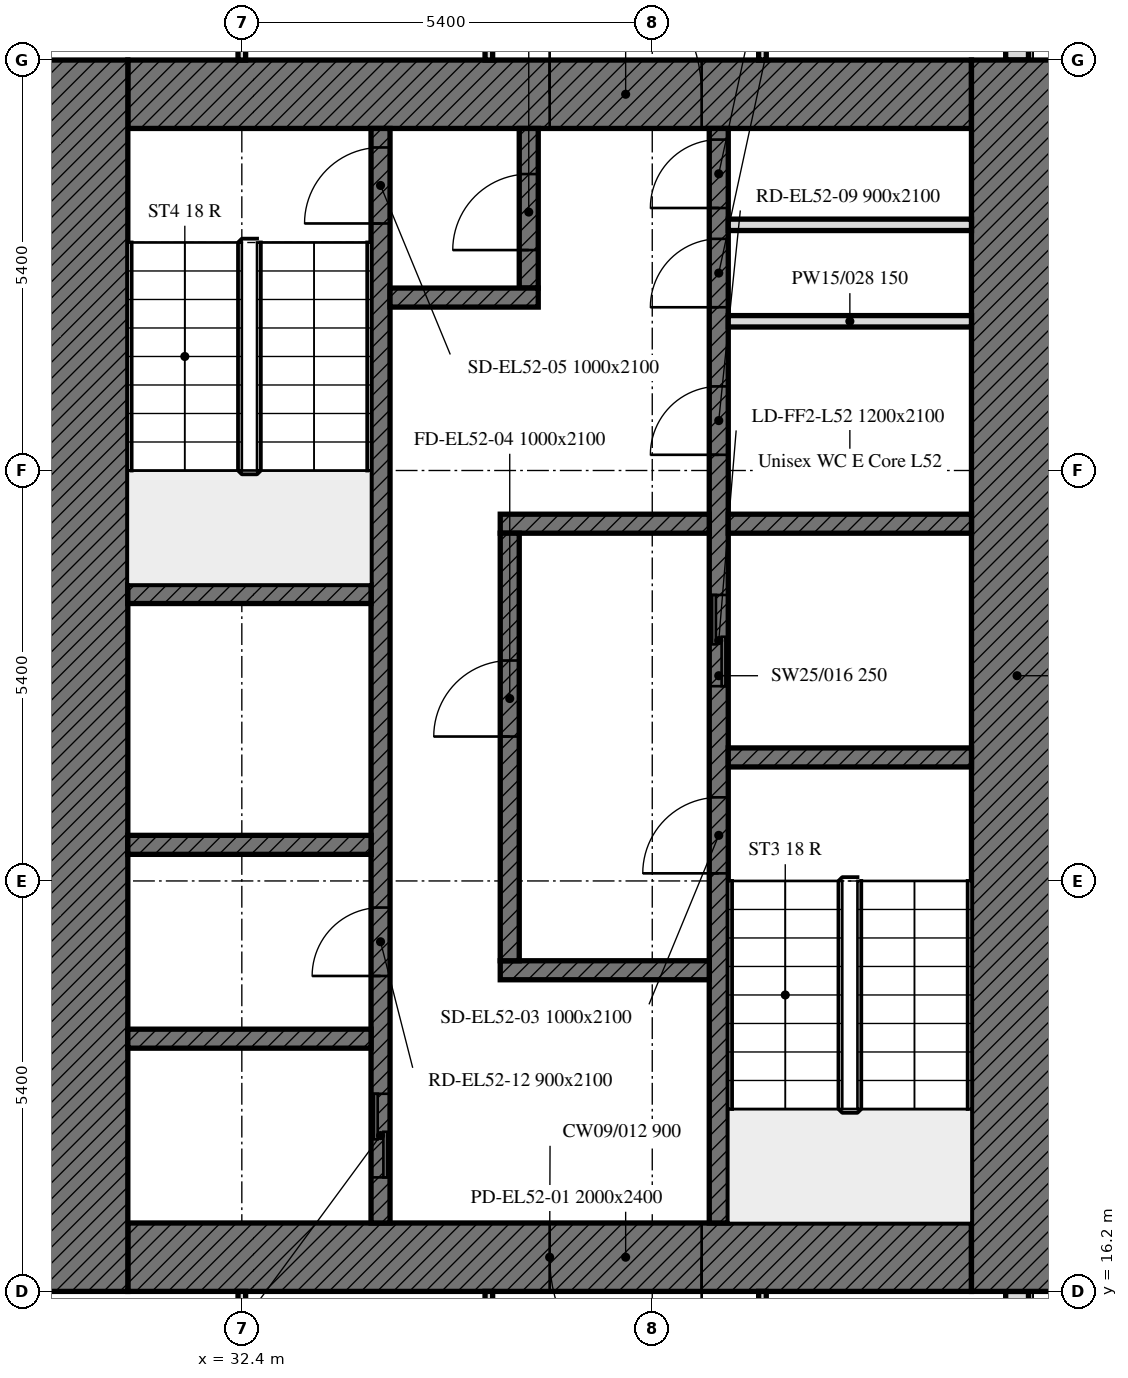
"""IFC4 building model, lengths in metres.
Left out: names, types, materials, properties, quantities, classifications, styles, units other than length and angle.
Written with IfcOpenShell. Run it as: python <this file> out.ifc"""

import sys

from ifc_helpers import new_model, si_unit, direction, frame, frame_2d, origin, place, context, subcontext, project, spatial, rectangle, extrude, element, fill, save


model = new_model("IFC4")
c1 = context("Model", 3, precision=1e-05, world=origin(), true_north=direction((0.0, 1.0)))
c2 = subcontext(c1, "Body", "Model", "MODEL_VIEW")
j1 = project(units=[si_unit("LENGTHUNIT", "METRE"), si_unit("PLANEANGLEUNIT", "RADIAN")], contexts=[c1])
p1 = place(None, origin())
s1 = spatial("IfcSite", under=j1, at=p1, CompositionType="ELEMENT")
p2 = place(p1, origin())
s2 = spatial("IfcBuilding", under=s1, at=p2, CompositionType="ELEMENT")
p3 = place(p2, frame((0.0, 0.0, 210.4)))
s3 = spatial("IfcBuildingStorey", under=s2, at=p3, CompositionType="ELEMENT", Elevation=210.4)
p4 = place(p3, frame((42.6, 10.986, 0.0), z_axis=(0.0, 0.0, 1.0), x_axis=(0.0, 1.0, 0.0)))
e1 = element("IfcWall", 1, at=p4, inside=s3, PredefinedType="SOLIDWALL", context=c2, shape_type="SweptSolid", body=[
    extrude(rectangle(XDim=5.214, YDim=0.3, at=frame_2d((2.607, 0.0))), origin(), (0.0, 0.0, 1.0), 3.0),
])
p5 = place(p4, frame((1.164, 0.0, 0.9)))
e2 = element("IfcOpeningElement", 2, at=p5, cuts=e1, PredefinedType="OPENING", context=c2, shape_type="SweptSolid", body=[
    extrude(rectangle(XDim=1.1, YDim=1.7, at=frame_2d((0.55, 0.85))), frame((0.0, 0.16, 0.0), z_axis=(0.0, -1.0, 0.0), x_axis=(1.0, 0.0, 0.0)), (0.0, 0.0, 1.0), 0.32),
])
p6 = place(p4, frame((2.764, 0.0, 0.9)))
e3 = element("IfcOpeningElement", 3, at=p6, cuts=e1, PredefinedType="OPENING", context=c2, shape_type="SweptSolid", body=[
    extrude(rectangle(XDim=1.1, YDim=1.7, at=frame_2d((0.55, 0.85))), frame((0.0, 0.16, 0.0), z_axis=(0.0, -1.0, 0.0), x_axis=(1.0, 0.0, 0.0)), (0.0, 0.0, 1.0), 0.32),
])
p7 = place(p3, frame((42.6, 32.4, 0.0), z_axis=(0.0, 0.0, 1.0), x_axis=(0.0, 1.0, 0.0)))
e4 = element("IfcWall", 4, at=p7, inside=s3, PredefinedType="SOLIDWALL", context=c2, shape_type="SweptSolid", body=[
    extrude(rectangle(XDim=10.614, YDim=0.3, at=frame_2d((5.307, 0.0))), origin(), (0.0, 0.0, 1.0), 3.0),
])
p8 = place(p7, frame((1.35, 0.0, 0.9)))
e5 = element("IfcOpeningElement", 5, at=p8, cuts=e4, PredefinedType="OPENING", context=c2, shape_type="SweptSolid", body=[
    extrude(rectangle(XDim=1.1, YDim=1.7, at=frame_2d((0.55, 0.85))), frame((0.0, 0.16, 0.0), z_axis=(0.0, -1.0, 0.0), x_axis=(1.0, 0.0, 0.0)), (0.0, 0.0, 1.0), 0.32),
])
p9 = place(p7, frame((2.95, 0.0, 0.9)))
e6 = element("IfcOpeningElement", 6, at=p9, cuts=e4, PredefinedType="OPENING", context=c2, shape_type="SweptSolid", body=[
    extrude(rectangle(XDim=1.1, YDim=1.7, at=frame_2d((0.55, 0.85))), frame((0.0, 0.16, 0.0), z_axis=(0.0, -1.0, 0.0), x_axis=(1.0, 0.0, 0.0)), (0.0, 0.0, 1.0), 0.32),
])
p10 = place(p7, frame((6.825, 0.0, 0.9)))
e7 = element("IfcOpeningElement", 7, at=p10, cuts=e4, PredefinedType="OPENING", context=c2, shape_type="SweptSolid", body=[
    extrude(rectangle(XDim=0.65, YDim=1.7, at=frame_2d((0.325, 0.85))), frame((0.0, 0.16, 0.0), z_axis=(0.0, -1.0, 0.0), x_axis=(1.0, 0.0, 0.0)), (0.0, 0.0, 1.0), 0.32),
])
p11 = place(p7, frame((8.35, 0.0, 0.9)))
e8 = element("IfcOpeningElement", 8, at=p11, cuts=e4, PredefinedType="OPENING", context=c2, shape_type="SweptSolid", body=[
    extrude(rectangle(XDim=1.1, YDim=1.7, at=frame_2d((0.55, 0.85))), frame((0.0, 0.16, 0.0), z_axis=(0.0, -1.0, 0.0), x_axis=(1.0, 0.0, 0.0)), (0.0, 0.0, 1.0), 0.32),
])
p12 = place(p3, frame((42.0, 16.65, 0.0), z_axis=(0.0, 0.0, 1.0), x_axis=(-1.0, 0.0, 0.0)))
e9 = element("IfcWall", 9, at=p12, inside=s3, PredefinedType="SOLIDWALL", context=c2, shape_type="SweptSolid", body=[
    extrude(rectangle(XDim=11.1, YDim=0.9, at=frame_2d((5.55, 0.0))), origin(), (0.0, 0.0, 1.0), 3.0),
])
p13 = place(p12, frame((3.55, 0.0, 0.0)))
e10 = element("IfcOpeningElement", 10, at=p13, cuts=e9, PredefinedType="OPENING", context=c2, shape_type="SweptSolid", body=[
    extrude(rectangle(XDim=2.0, YDim=2.4, at=frame_2d((1.0, 1.2))), frame((0.0, 0.45, 0.0), z_axis=(0.0, -1.0, 0.0), x_axis=(1.0, 0.0, 0.0)), (0.0, 0.0, 1.0), 0.9),
])
p14 = place(p3, frame((30.9, 31.95, 0.0), z_axis=(0.0, 0.0, 1.0), x_axis=(1.0, 0.0, 0.0)))
e11 = element("IfcWall", 11, at=p14, inside=s3, PredefinedType="SOLIDWALL", context=c2, shape_type="SweptSolid", body=[
    extrude(rectangle(XDim=11.1, YDim=0.9, at=frame_2d((5.55, 0.0))), origin(), (0.0, 0.0, 1.0), 3.0),
])
p15 = place(p14, frame((5.55, 0.0, 0.0)))
e12 = element("IfcOpeningElement", 12, at=p15, cuts=e11, PredefinedType="OPENING", context=c2, shape_type="SweptSolid", body=[
    extrude(rectangle(XDim=2.0, YDim=2.4, at=frame_2d((1.0, 1.2))), frame((0.0, 0.45, 0.0), z_axis=(0.0, -1.0, 0.0), x_axis=(1.0, 0.0, 0.0)), (0.0, 0.0, 1.0), 0.9),
])
for number, where, z_axis, x_axis in (
    (13, (42.6, 32.4, 0.0), (0.0, 0.0, 1.0), (0.0, -1.0, 0.0)),
    (14, (30.3, 16.2, 0.0), (0.0, 0.0, 1.0), (0.0, 1.0, 0.0)),
):
    element("IfcWall", number, at=place(p3, frame(where, z_axis=z_axis, x_axis=x_axis)), inside=s3, PredefinedType="SOLIDWALL", context=c2, shape_type="SweptSolid", body=[
        extrude(rectangle(XDim=16.2, YDim=1.2, at=frame_2d((8.1, 0.0))), origin(), (0.0, 0.0, 1.0), 3.0),
    ])
p16 = place(p3, frame((38.675, 17.1, 0.0), z_axis=(0.0, 0.0, 1.0), x_axis=(0.0, 1.0, 0.0)))
e15 = element("IfcWall", 15, at=p16, inside=s3, PredefinedType="SOLIDWALL", context=c2, shape_type="SweptSolid", body=[
    extrude(rectangle(XDim=14.4, YDim=0.25, at=frame_2d((7.2, 0.0))), origin(), (0.0, 0.0, 1.0), 3.0),
])
p17 = place(p16, frame((4.6, 0.0, 0.0)))
e16 = element("IfcOpeningElement", 16, at=p17, cuts=e15, PredefinedType="OPENING", context=c2, shape_type="SweptSolid", body=[
    extrude(rectangle(XDim=1.0, YDim=2.1, at=frame_2d((0.5, 1.05))), frame((0.0, 0.125, 0.0), z_axis=(0.0, -1.0, 0.0), x_axis=(1.0, 0.0, 0.0)), (0.0, 0.0, 1.0), 0.25),
])
p18 = place(p16, frame((7.062, 0.0, 0.0)))
e17 = element("IfcOpeningElement", 17, at=p18, cuts=e15, PredefinedType="OPENING", context=c2, shape_type="SweptSolid", body=[
    extrude(rectangle(XDim=1.2, YDim=2.1, at=frame_2d((0.6, 1.05))), frame((0.0, 0.125, 0.0), z_axis=(0.0, -1.0, 0.0), x_axis=(1.0, 0.0, 0.0)), (0.0, 0.0, 1.0), 0.25),
])
p19 = place(p16, frame((10.106, 0.0, 0.0)))
e18 = element("IfcOpeningElement", 18, at=p19, cuts=e15, PredefinedType="OPENING", context=c2, shape_type="SweptSolid", body=[
    extrude(rectangle(XDim=0.9, YDim=2.1, at=frame_2d((0.45, 1.05))), frame((0.0, 0.125, 0.0), z_axis=(0.0, -1.0, 0.0), x_axis=(1.0, 0.0, 0.0)), (0.0, 0.0, 1.0), 0.25),
])
p20 = place(p16, frame((12.048, 0.0, 0.0)))
e19 = element("IfcOpeningElement", 19, at=p20, cuts=e15, PredefinedType="OPENING", context=c2, shape_type="SweptSolid", body=[
    extrude(rectangle(XDim=0.9, YDim=2.1, at=frame_2d((0.45, 1.05))), frame((0.0, 0.125, 0.0), z_axis=(0.0, -1.0, 0.0), x_axis=(1.0, 0.0, 0.0)), (0.0, 0.0, 1.0), 0.25),
])
p21 = place(p16, frame((13.354, 0.0, 0.0)))
e20 = element("IfcOpeningElement", 20, at=p21, cuts=e15, PredefinedType="OPENING", context=c2, shape_type="SweptSolid", body=[
    extrude(rectangle(XDim=0.9, YDim=2.1, at=frame_2d((0.45, 1.05))), frame((0.0, 0.125, 0.0), z_axis=(0.0, -1.0, 0.0), x_axis=(1.0, 0.0, 0.0)), (0.0, 0.0, 1.0), 0.25),
])
p22 = place(p3, frame((34.225, 17.1, 0.0), z_axis=(0.0, 0.0, 1.0), x_axis=(0.0, 1.0, 0.0)))
e21 = element("IfcWall", 21, at=p22, inside=s3, PredefinedType="SOLIDWALL", context=c2, shape_type="SweptSolid", body=[
    extrude(rectangle(XDim=14.4, YDim=0.25, at=frame_2d((7.2, 0.0))), origin(), (0.0, 0.0, 1.0), 3.0),
])
p23 = place(p22, frame((13.15, 0.0, 0.0)))
e22 = element("IfcOpeningElement", 22, at=p23, cuts=e21, PredefinedType="OPENING", context=c2, shape_type="SweptSolid", body=[
    extrude(rectangle(XDim=1.0, YDim=2.1, at=frame_2d((0.5, 1.05))), frame((0.0, 0.125, 0.0), z_axis=(0.0, -1.0, 0.0), x_axis=(1.0, 0.0, 0.0)), (0.0, 0.0, 1.0), 0.25),
])
p24 = place(p22, frame((0.6, 0.0, 0.0)))
e23 = element("IfcOpeningElement", 23, at=p24, cuts=e21, PredefinedType="OPENING", context=c2, shape_type="SweptSolid", body=[
    extrude(rectangle(XDim=1.1, YDim=2.1, at=frame_2d((0.55, 1.05))), frame((0.0, 0.125, 0.0), z_axis=(0.0, -1.0, 0.0), x_axis=(1.0, 0.0, 0.0)), (0.0, 0.0, 1.0), 0.25),
])
p25 = place(p22, frame((3.25, 0.0, 0.0)))
e24 = element("IfcOpeningElement", 24, at=p25, cuts=e21, PredefinedType="OPENING", context=c2, shape_type="SweptSolid", body=[
    extrude(rectangle(XDim=0.9, YDim=2.1, at=frame_2d((0.45, 1.05))), frame((0.0, 0.125, 0.0), z_axis=(0.0, -1.0, 0.0), x_axis=(1.0, 0.0, 0.0)), (0.0, 0.0, 1.0), 0.25),
])
p26 = place(p3, frame((38.8, 23.225, 0.0), z_axis=(0.0, 0.0, 1.0), x_axis=(1.0, 0.0, 0.0)))
e25 = element("IfcWall", 25, at=p26, inside=s3, PredefinedType="SOLIDWALL", context=c2, shape_type="SweptSolid", body=[
    extrude(rectangle(XDim=3.2, YDim=0.25, at=frame_2d((1.6, 0.0))), origin(), (0.0, 0.0, 1.0), 3.0),
])
for number, where, z_axis, x_axis in (
    (26, (30.9, 25.375, 0.0), (0.0, 0.0, 1.0), (1.0, 0.0, 0.0)),
    (27, (30.9, 22.075, 0.0), (0.0, 0.0, 1.0), (1.0, 0.0, 0.0)),
):
    element("IfcWall", number, at=place(p3, frame(where, z_axis=z_axis, x_axis=x_axis)), inside=s3, PredefinedType="SOLIDWALL", context=c2, shape_type="SweptSolid", body=[
        extrude(rectangle(XDim=3.2, YDim=0.25, at=frame_2d((1.6, 0.0))), origin(), (0.0, 0.0, 1.0), 3.0),
    ])
p27 = place(p3, frame((38.8, 26.3, 0.0), z_axis=(0.0, 0.0, 1.0), x_axis=(1.0, 0.0, 0.0)))
e28 = element("IfcWall", 28, at=p27, inside=s3, PredefinedType="SOLIDWALL", context=c2, shape_type="SweptSolid", body=[
    extrude(rectangle(XDim=3.2, YDim=0.25, at=frame_2d((1.6, 0.0))), origin(), (0.0, 0.0, 1.0), 3.0),
])
for number, where, z_axis, x_axis in (
    (29, (35.8, 26.3, 0.0), (0.0, 0.0, 1.0), (1.0, 0.0, 0.0)),
    (30, (35.8, 20.425, 0.0), (0.0, 0.0, 1.0), (1.0, 0.0, 0.0)),
):
    element("IfcWall", number, at=place(p3, frame(where, z_axis=z_axis, x_axis=x_axis)), inside=s3, PredefinedType="SOLIDWALL", context=c2, shape_type="SweptSolid", body=[
        extrude(rectangle(XDim=2.75, YDim=0.25, at=frame_2d((1.375, 0.0))), origin(), (0.0, 0.0, 1.0), 3.0),
    ])
p28 = place(p3, frame((36.175, 29.4, 0.0), z_axis=(0.0, 0.0, 1.0), x_axis=(0.0, 1.0, 0.0)))
e31 = element("IfcWall", 31, at=p28, inside=s3, PredefinedType="SOLIDWALL", context=c2, shape_type="SweptSolid", body=[
    extrude(rectangle(XDim=2.1, YDim=0.25, at=frame_2d((1.05, 0.0))), origin(), (0.0, 0.0, 1.0), 3.0),
])
p29 = place(p28, frame((0.5, 0.0, 0.0)))
e32 = element("IfcOpeningElement", 32, at=p29, cuts=e31, PredefinedType="OPENING", context=c2, shape_type="SweptSolid", body=[
    extrude(rectangle(XDim=1.0, YDim=2.1, at=frame_2d((0.5, 1.05))), frame((0.0, 0.125, 0.0), z_axis=(0.0, -1.0, 0.0), x_axis=(1.0, 0.0, 0.0)), (0.0, 0.0, 1.0), 0.25),
])
p30 = place(p3, frame((34.35, 29.275, 0.0), z_axis=(0.0, 0.0, 1.0), x_axis=(1.0, 0.0, 0.0)))
e33 = element("IfcWall", 33, at=p30, inside=s3, PredefinedType="SOLIDWALL", context=c2, shape_type="SweptSolid", body=[
    extrude(rectangle(XDim=1.95, YDim=0.25, at=frame_2d((0.975, 0.0))), origin(), (0.0, 0.0, 1.0), 3.0),
])
p31 = place(p3, frame((35.925, 20.55, 0.0), z_axis=(0.0, 0.0, 1.0), x_axis=(0.0, 1.0, 0.0)))
e34 = element("IfcWall", 34, at=p31, inside=s3, PredefinedType="SOLIDWALL", context=c2, shape_type="SweptSolid", body=[
    extrude(rectangle(XDim=5.625, YDim=0.25, at=frame_2d((2.812, 0.0))), origin(), (0.0, 0.0, 1.0), 3.0),
])
p32 = place(p31, frame((2.95, 0.0, 0.0)))
e35 = element("IfcOpeningElement", 35, at=p32, cuts=e34, PredefinedType="OPENING", context=c2, shape_type="SweptSolid", body=[
    extrude(rectangle(XDim=1.0, YDim=2.1, at=frame_2d((0.5, 1.05))), frame((0.0, 0.125, 0.0), z_axis=(0.0, -1.0, 0.0), x_axis=(1.0, 0.0, 0.0)), (0.0, 0.0, 1.0), 0.25),
])
p33 = place(p3, frame((30.9, 19.525, 0.0), z_axis=(0.0, 0.0, 1.0), x_axis=(1.0, 0.0, 0.0)))
e36 = element("IfcWall", 36, at=p33, inside=s3, PredefinedType="SOLIDWALL", context=c2, shape_type="SweptSolid", body=[
    extrude(rectangle(XDim=3.2, YDim=0.25, at=frame_2d((1.6, 0.0))), origin(), (0.0, 0.0, 1.0), 3.0),
])
for number, where, z_axis, x_axis in (
    (37, (38.8, 28.963, 0.0), (0.0, 0.0, 1.0), (1.0, 0.0, 0.0)),
    (38, (38.8, 30.232, 0.0), (0.0, 0.0, 1.0), (1.0, 0.0, 0.0)),
):
    element("IfcWall", number, at=place(p3, frame(where, z_axis=z_axis, x_axis=x_axis)), inside=s3, PredefinedType="PARTITIONING", context=c2, shape_type="SweptSolid", body=[
        extrude(rectangle(XDim=3.2, YDim=0.15, at=frame_2d((1.6, 0.0))), origin(), (0.0, 0.0, 1.0), 3.0),
    ])
p34 = place(p3, frame((32.4, 32.4, 0.0), z_axis=(0.0, 0.0, 1.0), x_axis=(0.0, 1.0, 0.0)))
e39 = element("IfcWall", 39, at=p34, inside=s3, PredefinedType="PARTITIONING", context=c2, shape_type="SweptSolid", body=[
    extrude(rectangle(XDim=5.005, YDim=0.1, at=frame_2d((2.502, 0.0))), origin(), (0.0, 0.0, 1.0), 2.4),
])
for number, where, z_axis, x_axis in (
    (40, (39.25, 32.4, 0.0), (0.0, 0.0, 1.0), (0.0, 1.0, 0.0)),
    (41, (35.65, 38.175, 0.0), (0.0, 0.0, 1.0), (0.0, -1.0, 0.0)),
):
    element("IfcWall", number, at=place(p3, frame(where, z_axis=z_axis, x_axis=x_axis)), inside=s3, PredefinedType="PARTITIONING", context=c2, shape_type="SweptSolid", body=[
        extrude(rectangle(XDim=5.775, YDim=0.1, at=frame_2d((2.888, 0.0))), origin(), (0.0, 0.0, 1.0), 3.0),
    ])
for number, where, z_axis, x_axis in (
    (42, (32.4, 13.575, 0.0), (0.0, 0.0, 1.0), (0.0, 1.0, 0.0)),
    (43, (39.25, 13.575, 0.0), (0.0, 0.0, 1.0), (0.0, 1.0, 0.0)),
    (44, (35.65, 16.2, 0.0), (0.0, 0.0, 1.0), (0.0, -1.0, 0.0)),
):
    element("IfcWall", number, at=place(p3, frame(where, z_axis=z_axis, x_axis=x_axis)), inside=s3, PredefinedType="PARTITIONING", context=c2, shape_type="SweptSolid", body=[
        extrude(rectangle(XDim=2.625, YDim=0.1, at=frame_2d((1.312, 0.0))), origin(), (0.0, 0.0, 1.0), 3.0),
    ])
p35 = place(p13, origin())
e45 = element("IfcDoor", 45, at=p35, inside=s3, OperationType="DOUBLE_DOOR_SINGLE_SWING", PredefinedType="DOOR", context=c2, shape_type="SweptSolid", body=[
    extrude(rectangle(XDim=2.0, YDim=2.4, at=frame_2d((1.0, 1.2))), frame((0.0, 0.025, 0.0), z_axis=(0.0, -1.0, 0.0), x_axis=(1.0, 0.0, 0.0)), (0.0, 0.0, 1.0), 0.05),
])
fill(e10, e45)
p36 = place(p15, origin())
e46 = element("IfcDoor", 46, at=p36, inside=s3, OperationType="DOUBLE_DOOR_SINGLE_SWING", PredefinedType="DOOR", context=c2, shape_type="SweptSolid", body=[
    extrude(rectangle(XDim=2.0, YDim=2.4, at=frame_2d((1.0, 1.2))), frame((0.0, 0.025, 0.0), z_axis=(0.0, -1.0, 0.0), x_axis=(1.0, 0.0, 0.0)), (0.0, 0.0, 1.0), 0.05),
])
fill(e12, e46)
p37 = place(p17, origin())
e47 = element("IfcDoor", 47, at=p37, inside=s3, OperationType="SINGLE_SWING_LEFT", PredefinedType="DOOR", context=c2, shape_type="SweptSolid", body=[
    extrude(rectangle(XDim=1.0, YDim=2.1, at=frame_2d((0.5, 1.05))), frame((0.0, 0.025, 0.0), z_axis=(0.0, -1.0, 0.0), x_axis=(1.0, 0.0, 0.0)), (0.0, 0.0, 1.0), 0.05),
])
fill(e16, e47)
p38 = place(p32, origin())
e48 = element("IfcDoor", 48, at=p38, inside=s3, OperationType="SINGLE_SWING_LEFT", PredefinedType="DOOR", context=c2, shape_type="SweptSolid", body=[
    extrude(rectangle(XDim=1.0, YDim=2.1, at=frame_2d((0.5, 1.05))), frame((0.0, 0.025, 0.0), z_axis=(0.0, -1.0, 0.0), x_axis=(1.0, 0.0, 0.0)), (0.0, 0.0, 1.0), 0.05),
])
fill(e35, e48)
p39 = place(p23, origin())
e49 = element("IfcDoor", 49, at=p39, inside=s3, OperationType="SINGLE_SWING_LEFT", PredefinedType="DOOR", context=c2, shape_type="SweptSolid", body=[
    extrude(rectangle(XDim=1.0, YDim=2.1, at=frame_2d((0.5, 1.05))), frame((0.0, 0.025, 0.0), z_axis=(0.0, -1.0, 0.0), x_axis=(1.0, 0.0, 0.0)), (0.0, 0.0, 1.0), 0.05),
])
fill(e22, e49)
p40 = place(p29, origin())
e50 = element("IfcDoor", 50, at=p40, inside=s3, OperationType="SINGLE_SWING_LEFT", PredefinedType="DOOR", context=c2, shape_type="SweptSolid", body=[
    extrude(rectangle(XDim=1.0, YDim=2.1, at=frame_2d((0.5, 1.05))), frame((0.0, 0.025, 0.0), z_axis=(0.0, -1.0, 0.0), x_axis=(1.0, 0.0, 0.0)), (0.0, 0.0, 1.0), 0.05),
])
fill(e32, e50)
p41 = place(p18, origin())
e51 = element("IfcDoor", 51, at=p41, inside=s3, OperationType="DOUBLE_DOOR_SLIDING", PredefinedType="DOOR", context=c2, shape_type="SweptSolid", body=[
    extrude(rectangle(XDim=1.2, YDim=2.1, at=frame_2d((0.6, 1.05))), frame((0.0, 0.025, 0.0), z_axis=(0.0, -1.0, 0.0), x_axis=(1.0, 0.0, 0.0)), (0.0, 0.0, 1.0), 0.05),
])
fill(e17, e51)
p42 = place(p24, origin())
e52 = element("IfcDoor", 52, at=p42, inside=s3, OperationType="DOUBLE_DOOR_SLIDING", PredefinedType="DOOR", context=c2, shape_type="SweptSolid", body=[
    extrude(rectangle(XDim=1.1, YDim=2.1, at=frame_2d((0.55, 1.05))), frame((0.0, 0.025, 0.0), z_axis=(0.0, -1.0, 0.0), x_axis=(1.0, 0.0, 0.0)), (0.0, 0.0, 1.0), 0.05),
])
fill(e23, e52)
p43 = place(p19, origin())
e53 = element("IfcDoor", 53, at=p43, inside=s3, OperationType="SINGLE_SWING_LEFT", PredefinedType="DOOR", context=c2, shape_type="SweptSolid", body=[
    extrude(rectangle(XDim=0.9, YDim=2.1, at=frame_2d((0.45, 1.05))), frame((0.0, 0.025, 0.0), z_axis=(0.0, -1.0, 0.0), x_axis=(1.0, 0.0, 0.0)), (0.0, 0.0, 1.0), 0.05),
])
fill(e18, e53)
p44 = place(p20, origin())
e54 = element("IfcDoor", 54, at=p44, inside=s3, OperationType="SINGLE_SWING_LEFT", PredefinedType="DOOR", context=c2, shape_type="SweptSolid", body=[
    extrude(rectangle(XDim=0.9, YDim=2.1, at=frame_2d((0.45, 1.05))), frame((0.0, 0.025, 0.0), z_axis=(0.0, -1.0, 0.0), x_axis=(1.0, 0.0, 0.0)), (0.0, 0.0, 1.0), 0.05),
])
fill(e19, e54)
p45 = place(p21, origin())
e55 = element("IfcDoor", 55, at=p45, inside=s3, OperationType="SINGLE_SWING_LEFT", PredefinedType="DOOR", context=c2, shape_type="SweptSolid", body=[
    extrude(rectangle(XDim=0.9, YDim=2.1, at=frame_2d((0.45, 1.05))), frame((0.0, 0.025, 0.0), z_axis=(0.0, -1.0, 0.0), x_axis=(1.0, 0.0, 0.0)), (0.0, 0.0, 1.0), 0.05),
])
fill(e20, e55)
p46 = place(p25, origin())
e56 = element("IfcDoor", 56, at=p46, inside=s3, OperationType="SINGLE_SWING_LEFT", PredefinedType="DOOR", context=c2, shape_type="SweptSolid", body=[
    extrude(rectangle(XDim=0.9, YDim=2.1, at=frame_2d((0.45, 1.05))), frame((0.0, 0.025, 0.0), z_axis=(0.0, -1.0, 0.0), x_axis=(1.0, 0.0, 0.0)), (0.0, 0.0, 1.0), 0.05),
])
fill(e24, e56)
save(model, sys.argv[1])
